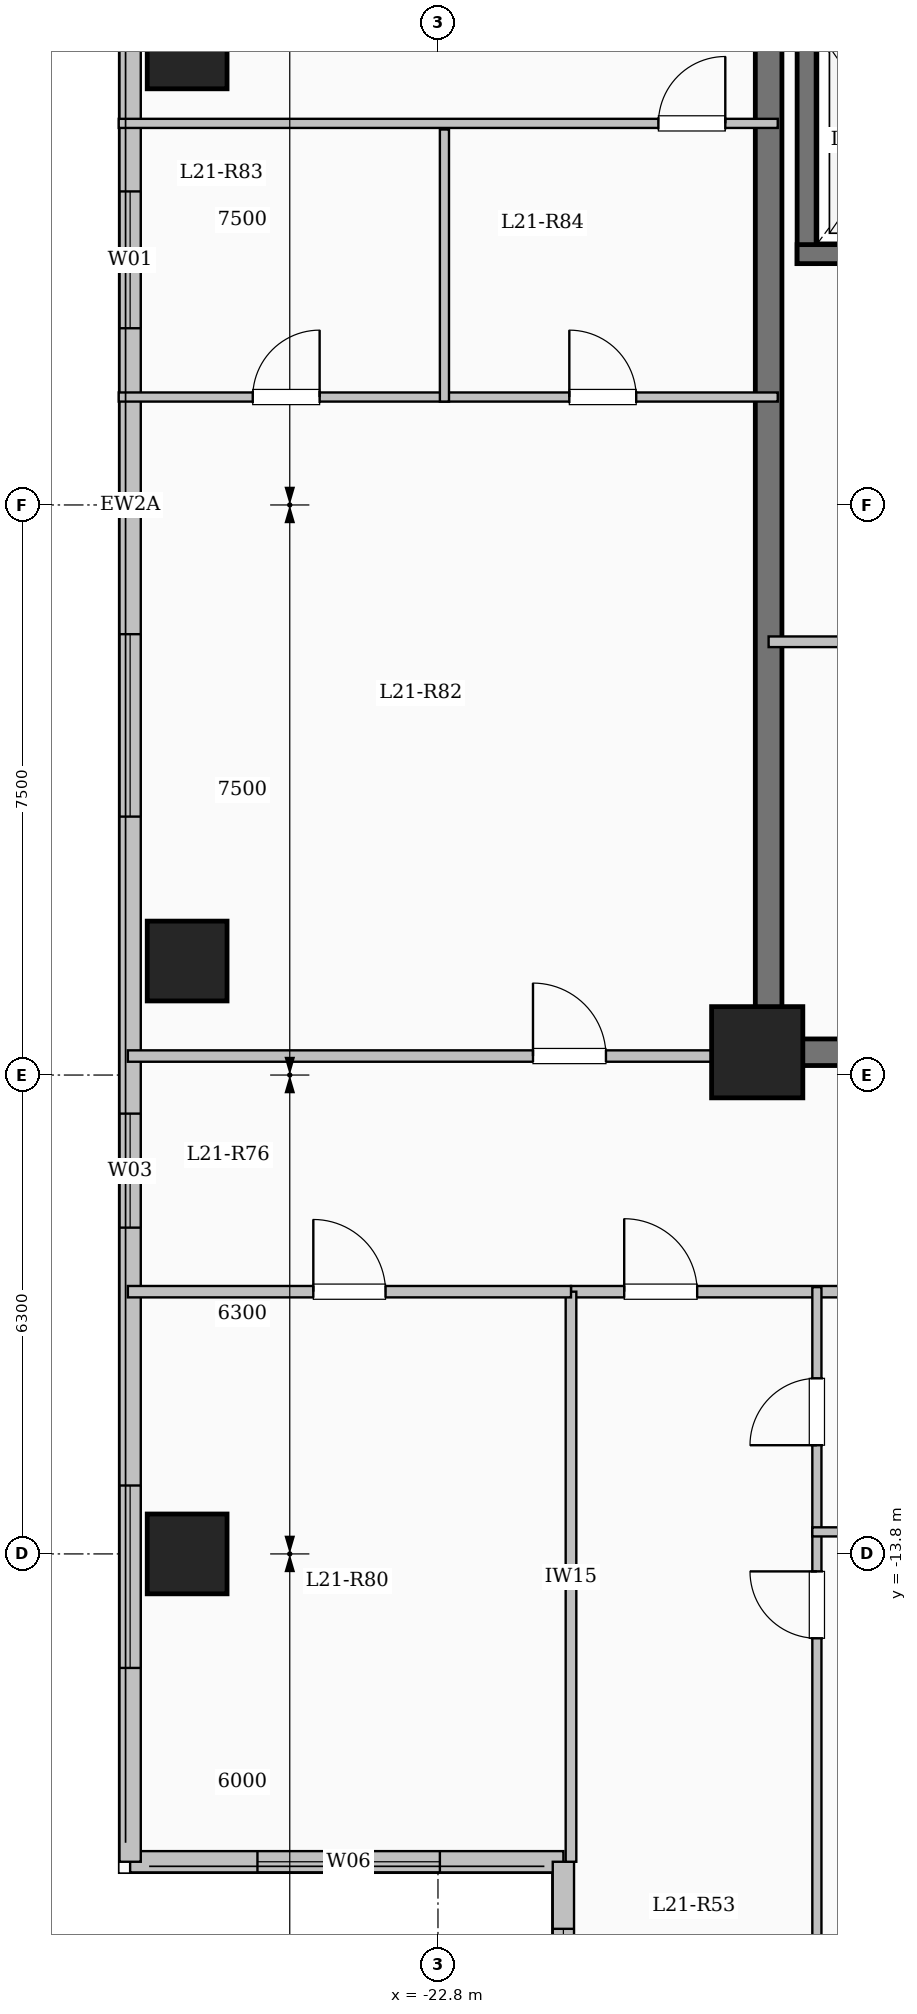
"""IFC4 building model, lengths in metres.
Left out: names, types, materials, properties, quantities, classifications, styles, units other than length and angle.
Written with IfcOpenShell. Run it as: python <this file> out.ifc"""

import sys

from ifc_helpers import new_model, si_unit, direction, frame, frame_2d, origin, origin_2d, place, context, subcontext, project, spatial, rectangle, extrude, element, fill, save


model = new_model("IFC4")
c1 = context("Model", 3, precision=1e-05, world=origin(), true_north=direction((0.0, 1.0)))
c2 = subcontext(c1, "Body", "Model", "MODEL_VIEW")
j1 = project(units=[si_unit("LENGTHUNIT", "METRE"), si_unit("PLANEANGLEUNIT", "RADIAN")], contexts=[c1])
p1 = place(None, origin())
s1 = spatial("IfcSite", under=j1, at=p1, CompositionType="ELEMENT")
p2 = place(p1, origin())
s2 = spatial("IfcBuilding", under=s1, at=p2, CompositionType="ELEMENT")
p3 = place(p2, frame((0.0, 0.0, 81.65)))
s3 = spatial("IfcBuildingStorey", under=s2, at=p3, CompositionType="ELEMENT", Elevation=81.65)
p4 = place(p3, frame((-18.6, -7.2, 0.0), z_axis=(0.0, 0.0, 1.0), x_axis=(1.0, 0.0, 0.0)))
e1 = element("IfcColumn", 1, at=p4, inside=s3, PredefinedType="COLUMN", context=c2, shape_type="SweptSolid", body=[
    extrude(rectangle(XDim=1.2, YDim=1.2, at=origin_2d()), origin(), (0.0, 0.0, 1.0), 3.35),
])
for number, where, z_axis, x_axis in (
    (2, (-26.1, -13.8, 0.0), (0.0, 0.0, 1.0), (1.0, 0.0, 0.0)),
    (3, (-26.1, -6.0, 0.0), (0.0, 0.0, 1.0), (1.0, 0.0, 0.0)),
    (4, (-26.1, 6.0, 0.0), (0.0, 0.0, 1.0), (1.0, 0.0, 0.0)),
):
    element("IfcColumn", number, at=place(p3, frame(where, z_axis=z_axis, x_axis=x_axis)), inside=s3, PredefinedType="COLUMN", context=c2, shape_type="SweptSolid", body=[
        extrude(rectangle(XDim=1.05, YDim=1.05, at=origin_2d()), origin(), (0.0, 0.0, 1.0), 3.35),
    ])
p5 = place(p3, frame((-21.15, -17.85, 0.0), z_axis=(0.0, 0.0, 1.0), x_axis=(-1.0, 0.0, 0.0)))
e5 = element("IfcWall", 5, at=p5, inside=s3, PredefinedType="SOLIDWALL", context=c2, shape_type="SweptSolid", body=[
    extrude(rectangle(XDim=5.7, YDim=0.28, at=frame_2d((2.85, 0.0))), origin(), (0.0, 0.0, 1.0), 3.1),
])
p6 = place(p5, frame((1.625, 0.0, 0.9)))
e6 = element("IfcOpeningElement", 6, at=p6, cuts=e5, PredefinedType="OPENING", context=c2, shape_type="SweptSolid", body=[
    extrude(rectangle(XDim=2.4, YDim=1.8, at=frame_2d((1.2, 0.9))), frame((0.0, 0.15, 0.0), z_axis=(0.0, -1.0, 0.0), x_axis=(1.0, 0.0, 0.0)), (0.0, 0.0, 1.0), 0.3),
])
p7 = place(p3, frame((-26.85, -17.85, 0.0), z_axis=(0.0, 0.0, 1.0), x_axis=(0.0, 1.0, 0.0)))
e7 = element("IfcWall", 7, at=p7, inside=s3, PredefinedType="SOLIDWALL", context=c2, shape_type="SweptSolid", body=[
    extrude(rectangle(XDim=35.7, YDim=0.28, at=frame_2d((17.85, 0.0))), origin(), (0.0, 0.0, 1.0), 3.1),
])
p8 = place(p7, frame((2.55, 0.0, 0.9)))
e8 = element("IfcOpeningElement", 8, at=p8, cuts=e7, PredefinedType="OPENING", context=c2, shape_type="SweptSolid", body=[
    extrude(rectangle(XDim=2.4, YDim=1.8, at=frame_2d((1.2, 0.9))), frame((0.0, 0.15, 0.0), z_axis=(0.0, -1.0, 0.0), x_axis=(1.0, 0.0, 0.0)), (0.0, 0.0, 1.0), 0.3),
])
p9 = place(p7, frame((8.343, 0.0, 0.9)))
e9 = element("IfcOpeningElement", 9, at=p9, cuts=e7, PredefinedType="OPENING", context=c2, shape_type="SweptSolid", body=[
    extrude(rectangle(XDim=1.5, YDim=1.65, at=frame_2d((0.75, 0.825))), frame((0.0, 0.15, 0.0), z_axis=(0.0, -1.0, 0.0), x_axis=(1.0, 0.0, 0.0)), (0.0, 0.0, 1.0), 0.3),
])
p10 = place(p7, frame((13.75, 0.0, 0.9)))
e10 = element("IfcOpeningElement", 10, at=p10, cuts=e7, PredefinedType="OPENING", context=c2, shape_type="SweptSolid", body=[
    extrude(rectangle(XDim=2.4, YDim=1.8, at=frame_2d((1.2, 0.9))), frame((0.0, 0.15, 0.0), z_axis=(0.0, -1.0, 0.0), x_axis=(1.0, 0.0, 0.0)), (0.0, 0.0, 1.0), 0.3),
])
p11 = place(p7, frame((20.175, 0.0, 0.9)))
e11 = element("IfcOpeningElement", 11, at=p11, cuts=e7, PredefinedType="OPENING", context=c2, shape_type="SweptSolid", body=[
    extrude(rectangle(XDim=1.8, YDim=1.65, at=frame_2d((0.9, 0.825))), frame((0.0, 0.15, 0.0), z_axis=(0.0, -1.0, 0.0), x_axis=(1.0, 0.0, 0.0)), (0.0, 0.0, 1.0), 0.3),
])
p12 = place(p7, frame((24.725, 0.0, 0.9)))
e12 = element("IfcOpeningElement", 12, at=p12, cuts=e7, PredefinedType="OPENING", context=c2, shape_type="SweptSolid", body=[
    extrude(rectangle(XDim=2.0, YDim=1.7, at=frame_2d((1.0, 0.85))), frame((0.0, 0.15, 0.0), z_axis=(0.0, -1.0, 0.0), x_axis=(1.0, 0.0, 0.0)), (0.0, 0.0, 1.0), 0.3),
])
p13 = place(p7, frame((28.975, 0.0, 0.95)))
e13 = element("IfcOpeningElement", 13, at=p13, cuts=e7, PredefinedType="OPENING", context=c2, shape_type="SweptSolid", body=[
    extrude(rectangle(XDim=1.0, YDim=1.5, at=frame_2d((0.5, 0.75))), frame((0.0, 0.15, 0.0), z_axis=(0.0, -1.0, 0.0), x_axis=(1.0, 0.0, 0.0)), (0.0, 0.0, 1.0), 0.3),
])
p14 = place(p7, frame((32.025, 0.0, 0.9)))
e14 = element("IfcOpeningElement", 14, at=p14, cuts=e7, PredefinedType="OPENING", context=c2, shape_type="SweptSolid", body=[
    extrude(rectangle(XDim=2.0, YDim=1.7, at=frame_2d((1.0, 0.85))), frame((0.0, 0.15, 0.0), z_axis=(0.0, -1.0, 0.0), x_axis=(1.0, 0.0, 0.0)), (0.0, 0.0, 1.0), 0.3),
])
p15 = place(p3, frame((-21.15, -22.05, 0.0), z_axis=(0.0, 0.0, 1.0), x_axis=(0.0, 1.0, 0.0)))
e15 = element("IfcWall", 15, at=p15, inside=s3, PredefinedType="SOLIDWALL", context=c2, shape_type="SweptSolid", body=[
    extrude(rectangle(XDim=4.2, YDim=0.28, at=frame_2d((2.1, 0.0))), origin(), (0.0, 0.0, 1.0), 3.1),
])
p16 = place(p15, frame((0.918, 0.0, 0.9)))
e16 = element("IfcOpeningElement", 16, at=p16, cuts=e15, PredefinedType="OPENING", context=c2, shape_type="SweptSolid", body=[
    extrude(rectangle(XDim=2.4, YDim=1.8, at=frame_2d((1.2, 0.9))), frame((0.0, 0.15, 0.0), z_axis=(0.0, -1.0, 0.0), x_axis=(1.0, 0.0, 0.0)), (0.0, 0.0, 1.0), 0.3),
])
p17 = place(p3, frame((-17.95, 3.175, 0.0), z_axis=(0.0, 0.0, 1.0), x_axis=(0.0, 1.0, 0.0)))
e17 = element("IfcWall", 17, at=p17, inside=s3, PredefinedType="SHEAR", context=c2, shape_type="SweptSolid", body=[
    extrude(rectangle(XDim=3.25, YDim=0.25, at=frame_2d((1.625, 0.0))), origin(), (0.0, 0.0, 1.0), 3.35),
])
p18 = place(p3, frame((-18.075, 3.3, 0.0), z_axis=(0.0, 0.0, 1.0), x_axis=(1.0, 0.0, 0.0)))
e18 = element("IfcWall", 18, at=p18, inside=s3, PredefinedType="SHEAR", context=c2, shape_type="SweptSolid", body=[
    extrude(rectangle(XDim=2.55, YDim=0.25, at=frame_2d((1.275, 0.0))), origin(), (0.0, 0.0, 1.0), 3.35),
])
p19 = place(p3, frame((-18.45, -7.375, 0.0), z_axis=(0.0, 0.0, 1.0), x_axis=(0.0, 1.0, 0.0)))
e19 = element("IfcWall", 19, at=p19, inside=s3, PredefinedType="SHEAR", context=c2, shape_type="SweptSolid", body=[
    extrude(rectangle(XDim=14.05, YDim=0.35, at=frame_2d((7.025, 0.0))), origin(), (0.0, 0.0, 1.0), 3.35),
])
p20 = place(p3, frame((-18.625, -7.2, 0.0), z_axis=(0.0, 0.0, 1.0), x_axis=(1.0, 0.0, 0.0)))
e20 = element("IfcWall", 20, at=p20, inside=s3, PredefinedType="SHEAR", context=c2, shape_type="SweptSolid", body=[
    extrude(rectangle(XDim=8.55, YDim=0.35, at=frame_2d((4.275, 0.0))), origin(), (0.0, 0.0, 1.0), 3.35),
])
p21 = place(p3, frame((-18.45, -1.8, 0.0), z_axis=(0.0, 0.0, 1.0), x_axis=(1.0, 0.0, 0.0)))
e21 = element("IfcWall", 21, at=p21, inside=s3, PredefinedType="PARTITIONING", context=c2, shape_type="SweptSolid", body=[
    extrude(rectangle(XDim=3.05, YDim=0.14, at=frame_2d((1.525, 0.0))), origin(), (0.0, 0.0, 1.0), 3.1),
])
p22 = place(p21, frame((1.05, 0.0, 0.0)))
e22 = element("IfcOpeningElement", 22, at=p22, cuts=e21, PredefinedType="OPENING", context=c2, shape_type="SweptSolid", body=[
    extrude(rectangle(XDim=0.9, YDim=2.08, at=frame_2d((0.45, 1.04))), frame((0.0, 0.08, 0.0), z_axis=(0.0, -1.0, 0.0), x_axis=(1.0, 0.0, 0.0)), (0.0, 0.0, 1.0), 0.16),
])
p23 = place(p3, frame((-21.05, -10.35, 0.0), z_axis=(0.0, 0.0, 1.0), x_axis=(1.0, 0.0, 0.0)))
e23 = element("IfcWall", 23, at=p23, inside=s3, PredefinedType="PARTITIONING", context=c2, shape_type="SweptSolid", body=[
    extrude(rectangle(XDim=12.5, YDim=0.15, at=frame_2d((6.25, 0.0))), origin(), (0.0, 0.0, 1.0), 3.1),
])
p24 = place(p23, frame((0.7, 0.0, 0.0)))
e24 = element("IfcOpeningElement", 24, at=p24, cuts=e23, PredefinedType="OPENING", context=c2, shape_type="SweptSolid", body=[
    extrude(rectangle(XDim=0.96, YDim=2.15, at=frame_2d((0.48, 1.075))), frame((0.0, 0.085, 0.0), z_axis=(0.0, -1.0, 0.0), x_axis=(1.0, 0.0, 0.0)), (0.0, 0.0, 1.0), 0.17),
])
p25 = place(p23, frame((6.925, 0.0, 0.0)))
e25 = element("IfcOpeningElement", 25, at=p25, cuts=e23, PredefinedType="OPENING", context=c2, shape_type="SweptSolid", body=[
    extrude(rectangle(XDim=0.96, YDim=2.15, at=frame_2d((0.48, 1.075))), frame((0.0, 0.085, 0.0), z_axis=(0.0, -1.0, 0.0), x_axis=(1.0, 0.0, 0.0)), (0.0, 0.0, 1.0), 0.17),
])
p26 = place(p3, frame((-17.815, -22.1, 0.0), z_axis=(0.0, 0.0, 1.0), x_axis=(0.0, 1.0, 0.0)))
e26 = element("IfcWall", 26, at=p26, inside=s3, PredefinedType="PARTITIONING", context=c2, shape_type="SweptSolid", body=[
    extrude(rectangle(XDim=8.59, YDim=0.12, at=frame_2d((4.295, 0.0))), origin(), (0.0, 0.0, 1.0), 3.1),
])
p27 = place(p26, frame((7.19, 0.0, 0.0)))
e27 = element("IfcOpeningElement", 27, at=p27, cuts=e26, PredefinedType="OPENING", context=c2, shape_type="SweptSolid", body=[
    extrude(rectangle(XDim=0.88, YDim=2.1, at=frame_2d((0.44, 1.05))), frame((0.0, 0.07, 0.0), z_axis=(0.0, -1.0, 0.0), x_axis=(1.0, 0.0, 0.0)), (0.0, 0.0, 1.0), 0.14),
])
p28 = place(p3, frame((-17.815, -13.51, 0.0), z_axis=(0.0, 0.0, 1.0), x_axis=(0.0, 1.0, 0.0)))
e28 = element("IfcWall", 28, at=p28, inside=s3, PredefinedType="PARTITIONING", context=c2, shape_type="SweptSolid", body=[
    extrude(rectangle(XDim=3.22, YDim=0.12, at=frame_2d((1.61, 0.0))), origin(), (0.0, 0.0, 1.0), 3.1),
])
p29 = place(p28, frame((1.14, 0.0, 0.0)))
e29 = element("IfcOpeningElement", 29, at=p29, cuts=e28, PredefinedType="OPENING", context=c2, shape_type="SweptSolid", body=[
    extrude(rectangle(XDim=0.88, YDim=2.1, at=frame_2d((0.44, 1.05))), frame((0.0, 0.07, 0.0), z_axis=(0.0, -1.0, 0.0), x_axis=(1.0, 0.0, 0.0)), (0.0, 0.0, 1.0), 0.14),
])
p30 = place(p3, frame((-17.875, -13.51, 0.0), z_axis=(0.0, 0.0, 1.0), x_axis=(1.0, 0.0, 0.0)))
e30 = element("IfcWall", 30, at=p30, inside=s3, PredefinedType="PARTITIONING", context=c2, shape_type="SweptSolid", body=[
    extrude(rectangle(XDim=3.11, YDim=0.12, at=frame_2d((1.555, 0.0))), origin(), (0.0, 0.0, 1.0), 3.1),
])
p31 = place(p3, frame((-26.88, -7.25, 0.0), z_axis=(0.0, 0.0, 1.0), x_axis=(1.0, 0.0, 0.0)))
e31 = element("IfcWall", 31, at=p31, inside=s3, PredefinedType="PARTITIONING", context=c2, shape_type="SweptSolid", body=[
    extrude(rectangle(XDim=8.43, YDim=0.15, at=frame_2d((4.215, 0.0))), origin(), (0.0, 0.0, 1.0), 3.1),
])
p32 = place(p31, frame((5.33, 0.0, 0.0)))
e32 = element("IfcOpeningElement", 32, at=p32, cuts=e31, PredefinedType="OPENING", context=c2, shape_type="SweptSolid", body=[
    extrude(rectangle(XDim=0.96, YDim=2.15, at=frame_2d((0.48, 1.075))), frame((0.0, 0.085, 0.0), z_axis=(0.0, -1.0, 0.0), x_axis=(1.0, 0.0, 0.0)), (0.0, 0.0, 1.0), 0.17),
])
p33 = place(p3, frame((-21.05, -17.85, 0.0), z_axis=(0.0, 0.0, 1.0), x_axis=(0.0, 1.0, 0.0)))
e33 = element("IfcWall", 33, at=p33, inside=s3, PredefinedType="PARTITIONING", context=c2, shape_type="SweptSolid", body=[
    extrude(rectangle(XDim=7.5, YDim=0.14, at=frame_2d((3.75, 0.0))), origin(), (0.0, 0.0, 1.0), 3.1),
])
p34 = place(p3, frame((-26.88, -10.35, 0.0), z_axis=(0.0, 0.0, 1.0), x_axis=(1.0, 0.0, 0.0)))
e34 = element("IfcWall", 34, at=p34, inside=s3, PredefinedType="PARTITIONING", context=c2, shape_type="SweptSolid", body=[
    extrude(rectangle(XDim=5.83, YDim=0.15, at=frame_2d((2.915, 0.0))), origin(), (0.0, 0.0, 1.0), 3.1),
])
p35 = place(p34, frame((2.44, 0.0, 0.0)))
e35 = element("IfcOpeningElement", 35, at=p35, cuts=e34, PredefinedType="OPENING", context=c2, shape_type="SweptSolid", body=[
    extrude(rectangle(XDim=0.95, YDim=2.15, at=frame_2d((0.475, 1.075))), frame((0.0, 0.085, 0.0), z_axis=(0.0, -1.0, 0.0), x_axis=(1.0, 0.0, 0.0)), (0.0, 0.0, 1.0), 0.17),
])
p36 = place(p3, frame((-27.0, 1.42, 0.0), z_axis=(0.0, 0.0, 1.0), x_axis=(1.0, 0.0, 0.0)))
e36 = element("IfcWall", 36, at=p36, inside=s3, PredefinedType="PARTITIONING", context=c2, shape_type="SweptSolid", body=[
    extrude(rectangle(XDim=8.67, YDim=0.12, at=frame_2d((4.335, 0.0))), origin(), (0.0, 0.0, 1.0), 3.1),
])
p37 = place(p36, frame((1.763, 0.0, 0.0)))
e37 = element("IfcOpeningElement", 37, at=p37, cuts=e36, PredefinedType="OPENING", context=c2, shape_type="SweptSolid", body=[
    extrude(rectangle(XDim=0.88, YDim=2.1, at=frame_2d((0.44, 1.05))), frame((0.0, 0.07, 0.0), z_axis=(0.0, -1.0, 0.0), x_axis=(1.0, 0.0, 0.0)), (0.0, 0.0, 1.0), 0.14),
])
p38 = place(p36, frame((5.928, 0.0, 0.0)))
e38 = element("IfcOpeningElement", 38, at=p38, cuts=e36, PredefinedType="OPENING", context=c2, shape_type="SweptSolid", body=[
    extrude(rectangle(XDim=0.88, YDim=2.1, at=frame_2d((0.44, 1.05))), frame((0.0, 0.07, 0.0), z_axis=(0.0, -1.0, 0.0), x_axis=(1.0, 0.0, 0.0)), (0.0, 0.0, 1.0), 0.14),
])
p39 = place(p3, frame((-27.0, 5.02, 0.0), z_axis=(0.0, 0.0, 1.0), x_axis=(1.0, 0.0, 0.0)))
e39 = element("IfcWall", 39, at=p39, inside=s3, PredefinedType="PARTITIONING", context=c2, shape_type="SweptSolid", body=[
    extrude(rectangle(XDim=8.67, YDim=0.12, at=frame_2d((4.335, 0.0))), origin(), (0.0, 0.0, 1.0), 3.1),
])
p40 = place(p39, frame((7.1, 0.0, 0.0)))
e40 = element("IfcOpeningElement", 40, at=p40, cuts=e39, PredefinedType="OPENING", context=c2, shape_type="SweptSolid", body=[
    extrude(rectangle(XDim=0.88, YDim=2.1, at=frame_2d((0.44, 1.05))), frame((0.0, 0.07, 0.0), z_axis=(0.0, -1.0, 0.0), x_axis=(1.0, 0.0, 0.0)), (0.0, 0.0, 1.0), 0.14),
])
p41 = place(p3, frame((-22.715, 1.36, 0.0), z_axis=(0.0, 0.0, 1.0), x_axis=(0.0, 1.0, 0.0)))
e41 = element("IfcWall", 41, at=p41, inside=s3, PredefinedType="PARTITIONING", context=c2, shape_type="SweptSolid", body=[
    extrude(rectangle(XDim=3.58, YDim=0.12, at=frame_2d((1.79, 0.0))), origin(), (0.0, 0.0, 1.0), 3.1),
])
p42 = place(p6, origin())
e42 = element("IfcWindow", 42, at=p42, inside=s3, PartitioningType="SINGLE_PANEL", PredefinedType="WINDOW", context=c2, shape_type="SweptSolid", body=[
    extrude(rectangle(XDim=2.4, YDim=1.8, at=frame_2d((1.2, 0.9))), frame((0.0, 0.03, 0.0), z_axis=(0.0, -1.0, 0.0), x_axis=(1.0, 0.0, 0.0)), (0.0, 0.0, 1.0), 0.06),
])
fill(e6, e42)
p43 = place(p8, origin())
e43 = element("IfcWindow", 43, at=p43, inside=s3, PartitioningType="SINGLE_PANEL", PredefinedType="WINDOW", context=c2, shape_type="SweptSolid", body=[
    extrude(rectangle(XDim=2.4, YDim=1.8, at=frame_2d((1.2, 0.9))), frame((0.0, 0.03, 0.0), z_axis=(0.0, -1.0, 0.0), x_axis=(1.0, 0.0, 0.0)), (0.0, 0.0, 1.0), 0.06),
])
fill(e8, e43)
p44 = place(p9, origin())
e44 = element("IfcWindow", 44, at=p44, inside=s3, PartitioningType="SINGLE_PANEL", PredefinedType="WINDOW", context=c2, shape_type="SweptSolid", body=[
    extrude(rectangle(XDim=1.5, YDim=1.65, at=frame_2d((0.75, 0.825))), frame((0.0, 0.03, 0.0), z_axis=(0.0, -1.0, 0.0), x_axis=(1.0, 0.0, 0.0)), (0.0, 0.0, 1.0), 0.06),
])
fill(e9, e44)
p45 = place(p10, origin())
e45 = element("IfcWindow", 45, at=p45, inside=s3, PartitioningType="SINGLE_PANEL", PredefinedType="WINDOW", context=c2, shape_type="SweptSolid", body=[
    extrude(rectangle(XDim=2.4, YDim=1.8, at=frame_2d((1.2, 0.9))), frame((0.0, 0.03, 0.0), z_axis=(0.0, -1.0, 0.0), x_axis=(1.0, 0.0, 0.0)), (0.0, 0.0, 1.0), 0.06),
])
fill(e10, e45)
p46 = place(p11, origin())
e46 = element("IfcWindow", 46, at=p46, inside=s3, PartitioningType="SINGLE_PANEL", PredefinedType="WINDOW", context=c2, shape_type="SweptSolid", body=[
    extrude(rectangle(XDim=1.8, YDim=1.65, at=frame_2d((0.9, 0.825))), frame((0.0, 0.03, 0.0), z_axis=(0.0, -1.0, 0.0), x_axis=(1.0, 0.0, 0.0)), (0.0, 0.0, 1.0), 0.06),
])
fill(e11, e46)
p47 = place(p16, origin())
e47 = element("IfcWindow", 47, at=p47, inside=s3, PartitioningType="SINGLE_PANEL", PredefinedType="WINDOW", context=c2, shape_type="SweptSolid", body=[
    extrude(rectangle(XDim=2.4, YDim=1.8, at=frame_2d((1.2, 0.9))), frame((0.0, 0.03, 0.0), z_axis=(0.0, -1.0, 0.0), x_axis=(1.0, 0.0, 0.0)), (0.0, 0.0, 1.0), 0.06),
])
fill(e16, e47)
p48 = place(p24, origin())
e48 = element("IfcDoor", 48, at=p48, inside=s3, OperationType="SINGLE_SWING_LEFT", PredefinedType="DOOR", context=c2, shape_type="SweptSolid", body=[
    extrude(rectangle(XDim=0.96, YDim=2.15, at=frame_2d((0.48, 1.075))), frame((0.0, 0.025, 0.0), z_axis=(0.0, -1.0, 0.0), x_axis=(1.0, 0.0, 0.0)), (0.0, 0.0, 1.0), 0.05),
])
fill(e24, e48)
p49 = place(p27, origin())
e49 = element("IfcDoor", 49, at=p49, inside=s3, OperationType="SINGLE_SWING_RIGHT", PredefinedType="DOOR", context=c2, shape_type="SweptSolid", body=[
    extrude(rectangle(XDim=0.88, YDim=2.1, at=frame_2d((0.44, 1.05))), frame((0.0, 0.025, 0.0), z_axis=(0.0, -1.0, 0.0), x_axis=(1.0, 0.0, 0.0)), (0.0, 0.0, 1.0), 0.05),
])
fill(e27, e49)
p50 = place(p29, origin())
e50 = element("IfcDoor", 50, at=p50, inside=s3, OperationType="SINGLE_SWING_LEFT", PredefinedType="DOOR", context=c2, shape_type="SweptSolid", body=[
    extrude(rectangle(XDim=0.88, YDim=2.1, at=frame_2d((0.44, 1.05))), frame((0.0, 0.025, 0.0), z_axis=(0.0, -1.0, 0.0), x_axis=(1.0, 0.0, 0.0)), (0.0, 0.0, 1.0), 0.05),
])
fill(e29, e50)
p51 = place(p35, origin())
e51 = element("IfcDoor", 51, at=p51, inside=s3, OperationType="SINGLE_SWING_LEFT", PredefinedType="DOOR", context=c2, shape_type="SweptSolid", body=[
    extrude(rectangle(XDim=0.95, YDim=2.15, at=frame_2d((0.475, 1.075))), frame((0.0, 0.025, 0.0), z_axis=(0.0, -1.0, 0.0), x_axis=(1.0, 0.0, 0.0)), (0.0, 0.0, 1.0), 0.05),
])
fill(e35, e51)
p52 = place(p32, origin())
e52 = element("IfcDoor", 52, at=p52, inside=s3, OperationType="SINGLE_SWING_LEFT", PredefinedType="DOOR", context=c2, shape_type="SweptSolid", body=[
    extrude(rectangle(XDim=0.96, YDim=2.15, at=frame_2d((0.48, 1.075))), frame((0.0, 0.025, 0.0), z_axis=(0.0, -1.0, 0.0), x_axis=(1.0, 0.0, 0.0)), (0.0, 0.0, 1.0), 0.05),
])
fill(e32, e52)
p53 = place(p37, origin())
e53 = element("IfcDoor", 53, at=p53, inside=s3, OperationType="SINGLE_SWING_RIGHT", PredefinedType="DOOR", context=c2, shape_type="SweptSolid", body=[
    extrude(rectangle(XDim=0.88, YDim=2.1, at=frame_2d((0.44, 1.05))), frame((0.0, 0.025, 0.0), z_axis=(0.0, -1.0, 0.0), x_axis=(1.0, 0.0, 0.0)), (0.0, 0.0, 1.0), 0.05),
])
fill(e37, e53)
p54 = place(p38, origin())
e54 = element("IfcDoor", 54, at=p54, inside=s3, OperationType="SINGLE_SWING_LEFT", PredefinedType="DOOR", context=c2, shape_type="SweptSolid", body=[
    extrude(rectangle(XDim=0.88, YDim=2.1, at=frame_2d((0.44, 1.05))), frame((0.0, 0.025, 0.0), z_axis=(0.0, -1.0, 0.0), x_axis=(1.0, 0.0, 0.0)), (0.0, 0.0, 1.0), 0.05),
])
fill(e38, e54)
p55 = place(p40, origin())
e55 = element("IfcDoor", 55, at=p55, inside=s3, OperationType="SINGLE_SWING_RIGHT", PredefinedType="DOOR", context=c2, shape_type="SweptSolid", body=[
    extrude(rectangle(XDim=0.88, YDim=2.1, at=frame_2d((0.44, 1.05))), frame((0.0, 0.025, 0.0), z_axis=(0.0, -1.0, 0.0), x_axis=(1.0, 0.0, 0.0)), (0.0, 0.0, 1.0), 0.05),
])
fill(e40, e55)
save(model, sys.argv[1])
